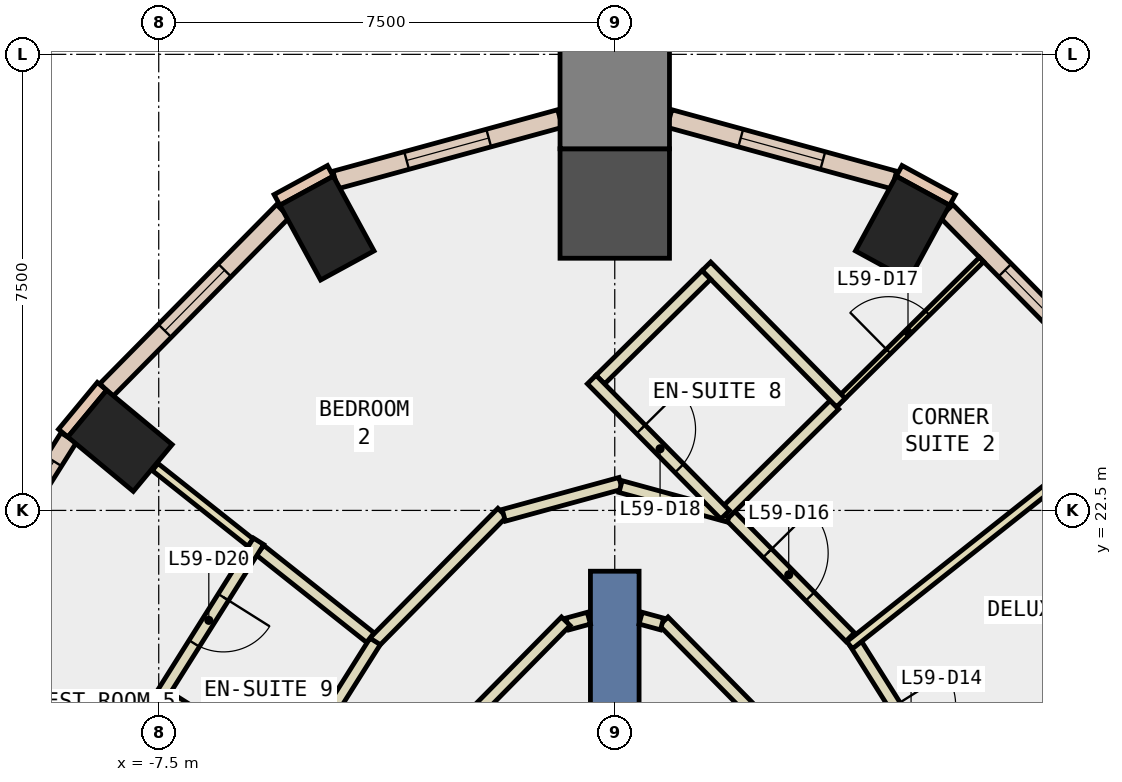
"""IFC4 building model, lengths in metres.
Left out: names, types, materials, properties, quantities, classifications, styles, units other than length and angle.
Written with IfcOpenShell. Run it as: python <this file> out.ifc"""

import sys

from ifc_helpers import new_model, si_unit, direction, frame, frame_2d, origin, origin_2d, place, context, subcontext, project, spatial, rectangle, extrude, element, fill, save


model = new_model("IFC4")
c1 = context("Model", 3, precision=1e-05, world=origin(), true_north=direction((0.0, 1.0)))
c2 = subcontext(c1, "Body", "Model", "MODEL_VIEW")
j1 = project(units=[si_unit("LENGTHUNIT", "METRE"), si_unit("PLANEANGLEUNIT", "RADIAN")], contexts=[c1])
p1 = place(None, origin())
s1 = spatial("IfcSite", under=j1, at=p1, CompositionType="ELEMENT")
p2 = place(p1, origin())
s2 = spatial("IfcBuilding", under=s1, at=p2, CompositionType="ELEMENT")
p3 = place(p2, frame((0.0, 0.0, 259.4)))
s3 = spatial("IfcBuildingStorey", under=s2, at=p3, CompositionType="ELEMENT", Elevation=259.4)
p4 = place(p3, frame((4.733, 27.143, -0.34), z_axis=(0.0, 0.0, 1.0), x_axis=(-0.87817506391, 0.478339374426, 0.0)))
e1 = element("IfcColumn", 1, at=p4, inside=s3, PredefinedType="COLUMN", context=c2, shape_type="SweptSolid", body=[
    extrude(rectangle(XDim=1.0, YDim=1.4, at=origin_2d()), origin(), (0.0, 0.0, 1.0), 3.6),
])
p5 = place(p3, frame((0.0, 27.547, -0.34), z_axis=(0.0, 0.0, 1.0), x_axis=(0.0, 1.0, 0.0)))
e2 = element("IfcColumn", 2, at=p5, inside=s3, PredefinedType="COLUMN", context=c2, shape_type="SweptSolid", body=[
    extrude(rectangle(XDim=1.8, YDim=1.8, at=origin_2d()), origin(), (0.0, 0.0, 1.0), 3.6),
])
for number, where, z_axis, x_axis in (
    (3, (-4.733, 27.143, -0.34), (0.0, 0.0, 1.0), (0.878, 0.478, 0.0)),
    (4, (-8.137, 23.645, -0.34), (0.0, 0.0, 1.0), (0.639, 0.769, 0.0)),
):
    element("IfcColumn", number, at=place(p3, frame(where, z_axis=z_axis, x_axis=x_axis)), inside=s3, PredefinedType="COLUMN", context=c2, shape_type="SweptSolid", body=[
        extrude(rectangle(XDim=1.0, YDim=1.4, at=origin_2d()), origin(), (0.0, 0.0, 1.0), 3.6),
    ])
p6 = place(p3, frame((0.0, 29.347, -0.34), z_axis=(0.0, 0.0, 1.0), x_axis=(0.0, 1.0, 0.0)))
e5 = element("IfcColumn", 5, at=p6, inside=s3, PredefinedType="COLUMN", context=c2, shape_type="SweptSolid", body=[
    extrude(rectangle(XDim=1.8, YDim=1.8, at=origin_2d()), origin(), (0.0, 0.0, 1.0), 3.6),
])
p7 = place(p3, frame((0.0, 12.5, -0.34), z_axis=(0.0, 0.0, 1.0), x_axis=(0.0, 1.0, 0.0)))
e6 = element("IfcWall", 6, at=p7, inside=s3, PredefinedType="SHEAR", context=c2, shape_type="SweptSolid", body=[
    extrude(rectangle(XDim=9.0, YDim=0.8, at=frame_2d((4.5, 0.0))), origin(), (0.0, 0.0, 1.0), 3.6),
])
for number, where, z_axis, x_axis in (
    (7, (5.555, 27.606, 0.0), (0.0, 0.0, 1.0), (-0.878, 0.478, 0.0)),
    (8, (-4.677, 28.084, 0.0), (0.0, 0.0, 1.0), (-0.878, -0.478, 0.0)),
):
    element("IfcWall", number, at=place(p3, frame(where, z_axis=z_axis, x_axis=x_axis)), inside=s3, PredefinedType="STANDARD", context=c2, shape_type="SweptSolid", body=[
        extrude(rectangle(XDim=1.0, YDim=0.2, at=frame_2d((0.5, 0.0))), origin(), (0.0, 0.0, 1.0), 3.26),
    ])
p8 = place(p3, frame((-8.433, 24.541, 0.0), z_axis=(0.0, 0.0, 1.0), x_axis=(-0.637972365578, -0.770059257953, 0.0)))
e9 = element("IfcWall", 9, at=p8, inside=s3, PredefinedType="STANDARD", context=c2, shape_type="SweptSolid", body=[
    extrude(rectangle(XDim=1.0, YDim=0.2, at=frame_2d((0.5, 0.0))), origin(), (0.0, 0.0, 1.0), 3.26),
])
p9 = place(p3, frame((8.361, 24.48, 0.0), z_axis=(0.0, 0.0, 1.0), x_axis=(-0.702488411246, 0.711695181989, 0.0)))
e10 = element("IfcWall", 10, at=p9, inside=s3, PredefinedType="STANDARD", context=c2, shape_type="SweptSolid", body=[
    extrude(rectangle(XDim=4.137, YDim=0.3, at=frame_2d((2.068, 0.0))), origin(), (0.0, 0.0, 1.0), 3.26),
])
p10 = place(p9, frame((1.368, 0.0, 0.9)))
e11 = element("IfcOpeningElement", 11, at=p10, cuts=e10, PredefinedType="OPENING", context=c2, shape_type="SweptSolid", body=[
    extrude(rectangle(XDim=1.4, YDim=2.0, at=frame_2d((0.7, 1.0))), frame((0.0, 0.16, 0.0), z_axis=(0.0, -1.0, 0.0), x_axis=(1.0, 0.0, 0.0)), (0.0, 0.0, 1.0), 0.32),
])
p11 = place(p3, frame((4.596, 27.933, 0.0), z_axis=(0.0, 0.0, 1.0), x_axis=(-0.964519409105, 0.264011949464, 0.0)))
e12 = element("IfcWall", 12, at=p11, inside=s3, PredefinedType="STANDARD", context=c2, shape_type="SweptSolid", body=[
    extrude(rectangle(XDim=3.833, YDim=0.3, at=frame_2d((1.917, 0.0))), origin(), (0.0, 0.0, 1.0), 3.26),
])
p12 = place(p11, frame((1.217, 0.0, 0.9)))
e13 = element("IfcOpeningElement", 13, at=p12, cuts=e12, PredefinedType="OPENING", context=c2, shape_type="SweptSolid", body=[
    extrude(rectangle(XDim=1.4, YDim=2.0, at=frame_2d((0.7, 1.0))), frame((0.0, 0.16, 0.0), z_axis=(0.0, -1.0, 0.0), x_axis=(1.0, 0.0, 0.0)), (0.0, 0.0, 1.0), 0.32),
])
p13 = place(p3, frame((-0.899, 28.945, 0.0), z_axis=(0.0, 0.0, 1.0), x_axis=(-0.964519409105, -0.264011949464, 0.0)))
e14 = element("IfcWall", 14, at=p13, inside=s3, PredefinedType="STANDARD", context=c2, shape_type="SweptSolid", body=[
    extrude(rectangle(XDim=3.833, YDim=0.3, at=frame_2d((1.917, 0.0))), origin(), (0.0, 0.0, 1.0), 3.26),
])
p14 = place(p13, frame((1.217, 0.0, 0.9)))
e15 = element("IfcOpeningElement", 15, at=p14, cuts=e14, PredefinedType="OPENING", context=c2, shape_type="SweptSolid", body=[
    extrude(rectangle(XDim=1.4, YDim=2.0, at=frame_2d((0.7, 1.0))), frame((0.0, 0.16, 0.0), z_axis=(0.0, -1.0, 0.0), x_axis=(1.0, 0.0, 0.0)), (0.0, 0.0, 1.0), 0.32),
])
p15 = place(p3, frame((-5.455, 27.424, 0.0), z_axis=(0.0, 0.0, 1.0), x_axis=(-0.702488411246, -0.711695181989, 0.0)))
e16 = element("IfcWall", 16, at=p15, inside=s3, PredefinedType="STANDARD", context=c2, shape_type="SweptSolid", body=[
    extrude(rectangle(XDim=4.137, YDim=0.3, at=frame_2d((2.068, 0.0))), origin(), (0.0, 0.0, 1.0), 3.26),
])
p16 = place(p15, frame((1.368, 0.0, 0.9)))
e17 = element("IfcOpeningElement", 17, at=p16, cuts=e16, PredefinedType="OPENING", context=c2, shape_type="SweptSolid", body=[
    extrude(rectangle(XDim=1.4, YDim=2.0, at=frame_2d((0.7, 1.0))), frame((0.0, 0.16, 0.0), z_axis=(0.0, -1.0, 0.0), x_axis=(1.0, 0.0, 0.0)), (0.0, 0.0, 1.0), 0.32),
])
p17 = place(p3, frame((-8.981, 23.697, 0.0), z_axis=(0.0, 0.0, 1.0), x_axis=(-0.532558226688, -0.846393369059, 0.0)))
e18 = element("IfcWall", 18, at=p17, inside=s3, PredefinedType="STANDARD", context=c2, shape_type="SweptSolid", body=[
    extrude(rectangle(XDim=5.637, YDim=0.3, at=frame_2d((2.818, 0.0))), origin(), (0.0, 0.0, 1.0), 3.26),
])
p18 = place(p17, frame((0.459, 0.0, 0.9)))
e19 = element("IfcOpeningElement", 19, at=p18, cuts=e18, PredefinedType="OPENING", context=c2, shape_type="SweptSolid", body=[
    extrude(rectangle(XDim=1.9, YDim=2.0, at=frame_2d((0.95, 1.0))), frame((0.0, 0.16, 0.0), z_axis=(0.0, -1.0, 0.0), x_axis=(1.0, 0.0, 0.0)), (0.0, 0.0, 1.0), 0.32),
])
p19 = place(p17, frame((3.278, 0.0, 0.9)))
e20 = element("IfcOpeningElement", 20, at=p19, cuts=e18, PredefinedType="OPENING", context=c2, shape_type="SweptSolid", body=[
    extrude(rectangle(XDim=1.9, YDim=2.0, at=frame_2d((0.95, 1.0))), frame((0.0, 0.16, 0.0), z_axis=(0.0, -1.0, 0.0), x_axis=(1.0, 0.0, 0.0)), (0.0, 0.0, 1.0), 0.32),
])
p20 = place(p3, frame((2.294, 19.167, 0.0), z_axis=(0.0, 0.0, 1.0), x_axis=(-0.70213913596, 0.712039769784, 0.0)))
e21 = element("IfcWall", 21, at=p20, inside=s3, PredefinedType="PARTITIONING", context=c2, shape_type="SweptSolid", body=[
    extrude(rectangle(XDim=2.121, YDim=0.2, at=frame_2d((1.06, 0.0))), origin(), (0.0, 0.0, 1.0), 3.26),
])
for number, where, z_axis, x_axis in (
    (22, (0.778, 20.632, 0.0), (0.0, 0.0, 1.0), (-0.965, 0.263, 0.0)),
    (23, (-0.426, 20.728, 0.0), (0.0, 0.0, 1.0), (-0.965, -0.263, 0.0)),
):
    element("IfcWall", number, at=place(p3, frame(where, z_axis=z_axis, x_axis=x_axis)), inside=s3, PredefinedType="PARTITIONING", context=c2, shape_type="SweptSolid", body=[
        extrude(rectangle(XDim=0.365, YDim=0.2, at=frame_2d((0.183, 0.0))), origin(), (0.0, 0.0, 1.0), 3.26),
    ])
p21 = place(p3, frame((-0.805, 20.677, 0.0), z_axis=(0.0, 0.0, 1.0), x_axis=(-0.70213913596, -0.712039769784, 0.0)))
e24 = element("IfcWall", 24, at=p21, inside=s3, PredefinedType="PARTITIONING", context=c2, shape_type="SweptSolid", body=[
    extrude(rectangle(XDim=2.121, YDim=0.2, at=frame_2d((1.06, 0.0))), origin(), (0.0, 0.0, 1.0), 3.26),
])
p22 = place(p3, frame((3.928, 20.367, 0.0), z_axis=(0.0, 0.0, 1.0), x_axis=(0.532616247911, -0.846356858814, 0.0)))
e25 = element("IfcWall", 25, at=p22, inside=s3, PredefinedType="PARTITIONING", context=c2, shape_type="SweptSolid", body=[
    extrude(rectangle(XDim=3.451, YDim=0.2, at=frame_2d((1.726, 0.0))), origin(), (0.0, 0.0, 1.0), 3.26),
])
p23 = place(p22, frame((1.275, 0.0, 0.0)))
e26 = element("IfcOpeningElement", 26, at=p23, cuts=e25, PredefinedType="OPENING", context=c2, shape_type="SweptSolid", body=[
    extrude(rectangle(XDim=1.0, YDim=2.1, at=frame_2d((0.5, 1.05))), frame((0.0, 0.11, 0.0), z_axis=(0.0, -1.0, 0.0), x_axis=(1.0, 0.0, 0.0)), (0.0, 0.0, 1.0), 0.22),
])
p24 = place(p3, frame((1.851, 22.464, 0.0), z_axis=(0.0, 0.0, 1.0), x_axis=(0.70237969133, -0.711802479068, 0.0)))
e27 = element("IfcWall", 27, at=p24, inside=s3, PredefinedType="PARTITIONING", context=c2, shape_type="SweptSolid", body=[
    extrude(rectangle(XDim=2.876, YDim=0.2, at=frame_2d((1.438, 0.0))), origin(), (0.0, 0.0, 1.0), 3.26),
])
p25 = place(p24, frame((0.938, 0.0, 0.0)))
e28 = element("IfcOpeningElement", 28, at=p25, cuts=e27, PredefinedType="OPENING", context=c2, shape_type="SweptSolid", body=[
    extrude(rectangle(XDim=1.0, YDim=2.1, at=frame_2d((0.5, 1.05))), frame((0.0, 0.11, 0.0), z_axis=(0.0, -1.0, 0.0), x_axis=(1.0, 0.0, 0.0)), (0.0, 0.0, 1.0), 0.22),
])
p26 = place(p3, frame((-4.012, 20.275, 0.0), z_axis=(0.0, 0.0, 1.0), x_axis=(0.702488437915, 0.711695155664, 0.0)))
e29 = element("IfcWall", 29, at=p26, inside=s3, PredefinedType="PARTITIONING", context=c2, shape_type="SweptSolid", body=[
    extrude(rectangle(XDim=3.076, YDim=0.2, at=frame_2d((1.538, 0.0))), origin(), (0.0, 0.0, 1.0), 3.26),
])
p27 = place(p3, frame((-1.825, 22.419, 0.0), z_axis=(0.0, 0.0, 1.0), x_axis=(0.964477541401, 0.26416485787, 0.0)))
e30 = element("IfcWall", 30, at=p27, inside=s3, PredefinedType="PARTITIONING", context=c2, shape_type="SweptSolid", body=[
    extrude(rectangle(XDim=1.992, YDim=0.2, at=frame_2d((0.996, 0.0))), origin(), (0.0, 0.0, 1.0), 3.26),
])
p28 = place(p3, frame((0.096, 22.892, 0.0), z_axis=(0.0, 0.0, 1.0), x_axis=(0.964519582336, -0.264011316595, 0.0)))
e31 = element("IfcWall", 31, at=p28, inside=s3, PredefinedType="PARTITIONING", context=c2, shape_type="SweptSolid", body=[
    extrude(rectangle(XDim=1.849, YDim=0.2, at=frame_2d((0.924, 0.0))), origin(), (0.0, 0.0, 1.0), 3.26),
])
p29 = place(p3, frame((-5.273, 18.23, 0.0), z_axis=(0.0, 0.0, 1.0), x_axis=(0.532743344325, 0.846276863135, 0.0)))
e32 = element("IfcWall", 32, at=p29, inside=s3, PredefinedType="PARTITIONING", context=c2, shape_type="SweptSolid", body=[
    extrude(rectangle(XDim=2.5, YDim=0.2, at=frame_2d((1.25, 0.0))), origin(), (0.0, 0.0, 1.0), 3.26),
])
p30 = place(p3, frame((3.863, 20.284, 0.0), z_axis=(0.0, 0.0, 1.0), x_axis=(0.783618453885, 0.621242399335, 0.0)))
e33 = element("IfcWall", 33, at=p30, inside=s3, PredefinedType="PARTITIONING", context=c2, shape_type="SweptSolid", body=[
    extrude(rectangle(XDim=4.717, YDim=0.15, at=frame_2d((2.358, 0.0))), origin(), (0.0, 0.0, 1.0), 3.26),
])
p31 = place(p3, frame((3.613, 24.237, 0.0), z_axis=(0.0, 0.0, 1.0), x_axis=(0.711651188682, 0.702532978335, 0.0)))
e34 = element("IfcWall", 34, at=p31, inside=s3, PredefinedType="PARTITIONING", context=c2, shape_type="SweptSolid", body=[
    extrude(rectangle(XDim=3.4, YDim=0.1, at=frame_2d((1.7, 0.0))), origin(), (0.0, 0.0, 1.0), 3.26),
])
p32 = place(p31, frame((1.25, 0.0, 0.0)))
e35 = element("IfcOpeningElement", 35, at=p32, cuts=e34, PredefinedType="OPENING", context=c2, shape_type="SweptSolid", body=[
    extrude(rectangle(XDim=0.9, YDim=2.1, at=frame_2d((0.45, 1.05))), frame((0.0, 0.06, 0.0), z_axis=(0.0, -1.0, 0.0), x_axis=(1.0, 0.0, 0.0)), (0.0, 0.0, 1.0), 0.12),
])
p33 = place(p3, frame((1.798, 22.446, 0.0), z_axis=(0.0, 0.0, 1.0), x_axis=(0.711782817297, 0.702399616316, 0.0)))
e36 = element("IfcWall", 36, at=p33, inside=s3, PredefinedType="PARTITIONING", context=c2, shape_type="SweptSolid", body=[
    extrude(rectangle(XDim=2.55, YDim=0.2, at=frame_2d((1.275, 0.0))), origin(), (0.0, 0.0, 1.0), 3.26),
])
p34 = place(p3, frame((3.719, 24.272, 0.0), z_axis=(0.0, 0.0, 1.0), x_axis=(-0.70232328337, 0.711858135893, 0.0)))
e37 = element("IfcWall", 37, at=p34, inside=s3, PredefinedType="PARTITIONING", context=c2, shape_type="SweptSolid", body=[
    extrude(rectangle(XDim=3.149, YDim=0.2, at=frame_2d((1.575, 0.0))), origin(), (0.0, 0.0, 1.0), 3.26),
])
p35 = place(p3, frame((1.506, 26.372, 0.0), z_axis=(0.0, 0.0, 1.0), x_axis=(-0.711773999329, -0.702408551969, 0.0)))
e38 = element("IfcWall", 38, at=p35, inside=s3, PredefinedType="PARTITIONING", context=c2, shape_type="SweptSolid", body=[
    extrude(rectangle(XDim=2.45, YDim=0.2, at=frame_2d((1.225, 0.0))), origin(), (0.0, 0.0, 1.0), 3.26),
])
p36 = place(p3, frame((-0.379, 24.652, 0.0), z_axis=(0.0, 0.0, 1.0), x_axis=(0.702559610983, -0.711624896286, 0.0)))
e39 = element("IfcWall", 39, at=p36, inside=s3, PredefinedType="PARTITIONING", context=c2, shape_type="SweptSolid", body=[
    extrude(rectangle(XDim=3.124, YDim=0.2, at=frame_2d((1.562, 0.0))), origin(), (0.0, 0.0, 1.0), 3.26),
])
p37 = place(p36, frame((1.15, 0.0, 0.0)))
e40 = element("IfcOpeningElement", 40, at=p37, cuts=e39, PredefinedType="OPENING", context=c2, shape_type="SweptSolid", body=[
    extrude(rectangle(XDim=0.9, YDim=2.1, at=frame_2d((0.45, 1.05))), frame((0.0, 0.11, 0.0), z_axis=(0.0, -1.0, 0.0), x_axis=(1.0, 0.0, 0.0)), (0.0, 0.0, 1.0), 0.22),
])
p38 = place(p3, frame((-5.99, 21.97, 0.0), z_axis=(0.0, 0.0, 1.0), x_axis=(-0.783573405437, 0.621299218003, 0.0)))
e41 = element("IfcWall", 41, at=p38, inside=s3, PredefinedType="PARTITIONING", context=c2, shape_type="SweptSolid", body=[
    extrude(rectangle(XDim=2.002, YDim=0.15, at=frame_2d((1.001, 0.0))), origin(), (0.0, 0.0, 1.0), 3.26),
])
p39 = place(p3, frame((-4.02, 20.408, 0.0), z_axis=(0.0, 0.0, 1.0), x_axis=(-0.783681902275, 0.621162358846, 0.0)))
e42 = element("IfcWall", 42, at=p39, inside=s3, PredefinedType="PARTITIONING", context=c2, shape_type="SweptSolid", body=[
    extrude(rectangle(XDim=2.313, YDim=0.2, at=frame_2d((1.157, 0.0))), origin(), (0.0, 0.0, 1.0), 3.26),
])
p40 = place(p3, frame((-5.858, 21.992, 0.0), z_axis=(0.0, 0.0, 1.0), x_axis=(-0.532874387162, -0.846194355634, 0.0)))
e43 = element("IfcWall", 43, at=p40, inside=s3, PredefinedType="PARTITIONING", context=c2, shape_type="SweptSolid", body=[
    extrude(rectangle(XDim=3.073, YDim=0.2, at=frame_2d((1.536, 0.0))), origin(), (0.0, 0.0, 1.0), 3.26),
])
p41 = place(p40, frame((1.086, 0.0, 0.0)))
e44 = element("IfcOpeningElement", 44, at=p41, cuts=e43, PredefinedType="OPENING", context=c2, shape_type="SweptSolid", body=[
    extrude(rectangle(XDim=0.9, YDim=2.1, at=frame_2d((0.45, 1.05))), frame((0.0, 0.11, 0.0), z_axis=(0.0, -1.0, 0.0), x_axis=(1.0, 0.0, 0.0)), (0.0, 0.0, 1.0), 0.22),
])
p42 = place(p3, frame((-7.357, 19.423, 0.0), z_axis=(0.0, 0.0, 1.0), x_axis=(0.846270070045, -0.532754135176, 0.0)))
e45 = element("IfcWall", 45, at=p42, inside=s3, PredefinedType="PARTITIONING", context=c2, shape_type="SweptSolid", body=[
    extrude(rectangle(XDim=2.3, YDim=0.2, at=frame_2d((1.15, 0.0))), origin(), (0.0, 0.0, 1.0), 3.26),
])
p43 = place(p10, origin())
e46 = element("IfcWindow", 46, at=p43, inside=s3, PartitioningType="SINGLE_PANEL", PredefinedType="WINDOW", context=c2, shape_type="SweptSolid", body=[
    extrude(rectangle(XDim=1.4, YDim=2.0, at=frame_2d((0.7, 1.0))), frame((0.0, 0.03, 0.0), z_axis=(0.0, -1.0, 0.0), x_axis=(1.0, 0.0, 0.0)), (0.0, 0.0, 1.0), 0.06),
])
fill(e11, e46)
p44 = place(p12, origin())
e47 = element("IfcWindow", 47, at=p44, inside=s3, PartitioningType="SINGLE_PANEL", PredefinedType="WINDOW", context=c2, shape_type="SweptSolid", body=[
    extrude(rectangle(XDim=1.4, YDim=2.0, at=frame_2d((0.7, 1.0))), frame((0.0, 0.03, 0.0), z_axis=(0.0, -1.0, 0.0), x_axis=(1.0, 0.0, 0.0)), (0.0, 0.0, 1.0), 0.06),
])
fill(e13, e47)
p45 = place(p14, origin())
e48 = element("IfcWindow", 48, at=p45, inside=s3, PartitioningType="SINGLE_PANEL", PredefinedType="WINDOW", context=c2, shape_type="SweptSolid", body=[
    extrude(rectangle(XDim=1.4, YDim=2.0, at=frame_2d((0.7, 1.0))), frame((0.0, 0.03, 0.0), z_axis=(0.0, -1.0, 0.0), x_axis=(1.0, 0.0, 0.0)), (0.0, 0.0, 1.0), 0.06),
])
fill(e15, e48)
p46 = place(p16, origin())
e49 = element("IfcWindow", 49, at=p46, inside=s3, PartitioningType="SINGLE_PANEL", PredefinedType="WINDOW", context=c2, shape_type="SweptSolid", body=[
    extrude(rectangle(XDim=1.4, YDim=2.0, at=frame_2d((0.7, 1.0))), frame((0.0, 0.03, 0.0), z_axis=(0.0, -1.0, 0.0), x_axis=(1.0, 0.0, 0.0)), (0.0, 0.0, 1.0), 0.06),
])
fill(e17, e49)
p47 = place(p18, origin())
e50 = element("IfcWindow", 50, at=p47, inside=s3, PartitioningType="SINGLE_PANEL", PredefinedType="WINDOW", context=c2, shape_type="SweptSolid", body=[
    extrude(rectangle(XDim=1.9, YDim=2.0, at=frame_2d((0.95, 1.0))), frame((0.0, 0.03, 0.0), z_axis=(0.0, -1.0, 0.0), x_axis=(1.0, 0.0, 0.0)), (0.0, 0.0, 1.0), 0.06),
])
fill(e19, e50)
p48 = place(p25, origin())
e51 = element("IfcDoor", 51, at=p48, inside=s3, OperationType="SINGLE_SWING_LEFT", PredefinedType="DOOR", context=c2, shape_type="SweptSolid", body=[
    extrude(rectangle(XDim=1.0, YDim=2.1, at=frame_2d((0.5, 1.05))), frame((0.0, 0.025, 0.0), z_axis=(0.0, -1.0, 0.0), x_axis=(1.0, 0.0, 0.0)), (0.0, 0.0, 1.0), 0.05),
])
fill(e28, e51)
p49 = place(p32, origin())
e52 = element("IfcDoor", 52, at=p49, inside=s3, OperationType="SINGLE_SWING_RIGHT", PredefinedType="DOOR", context=c2, shape_type="SweptSolid", body=[
    extrude(rectangle(XDim=0.9, YDim=2.1, at=frame_2d((0.45, 1.05))), frame((0.0, 0.025, 0.0), z_axis=(0.0, -1.0, 0.0), x_axis=(1.0, 0.0, 0.0)), (0.0, 0.0, 1.0), 0.05),
])
fill(e35, e52)
p50 = place(p37, origin())
e53 = element("IfcDoor", 53, at=p50, inside=s3, OperationType="SINGLE_SWING_RIGHT", PredefinedType="DOOR", context=c2, shape_type="SweptSolid", body=[
    extrude(rectangle(XDim=0.9, YDim=2.1, at=frame_2d((0.45, 1.05))), frame((0.0, 0.025, 0.0), z_axis=(0.0, -1.0, 0.0), x_axis=(1.0, 0.0, 0.0)), (0.0, 0.0, 1.0), 0.05),
])
fill(e40, e53)
p51 = place(p41, origin())
e54 = element("IfcDoor", 54, at=p51, inside=s3, OperationType="SINGLE_SWING_LEFT", PredefinedType="DOOR", context=c2, shape_type="SweptSolid", body=[
    extrude(rectangle(XDim=0.9, YDim=2.1, at=frame_2d((0.45, 1.05))), frame((0.0, 0.025, 0.0), z_axis=(0.0, -1.0, 0.0), x_axis=(1.0, 0.0, 0.0)), (0.0, 0.0, 1.0), 0.05),
])
fill(e44, e54)
save(model, sys.argv[1])
